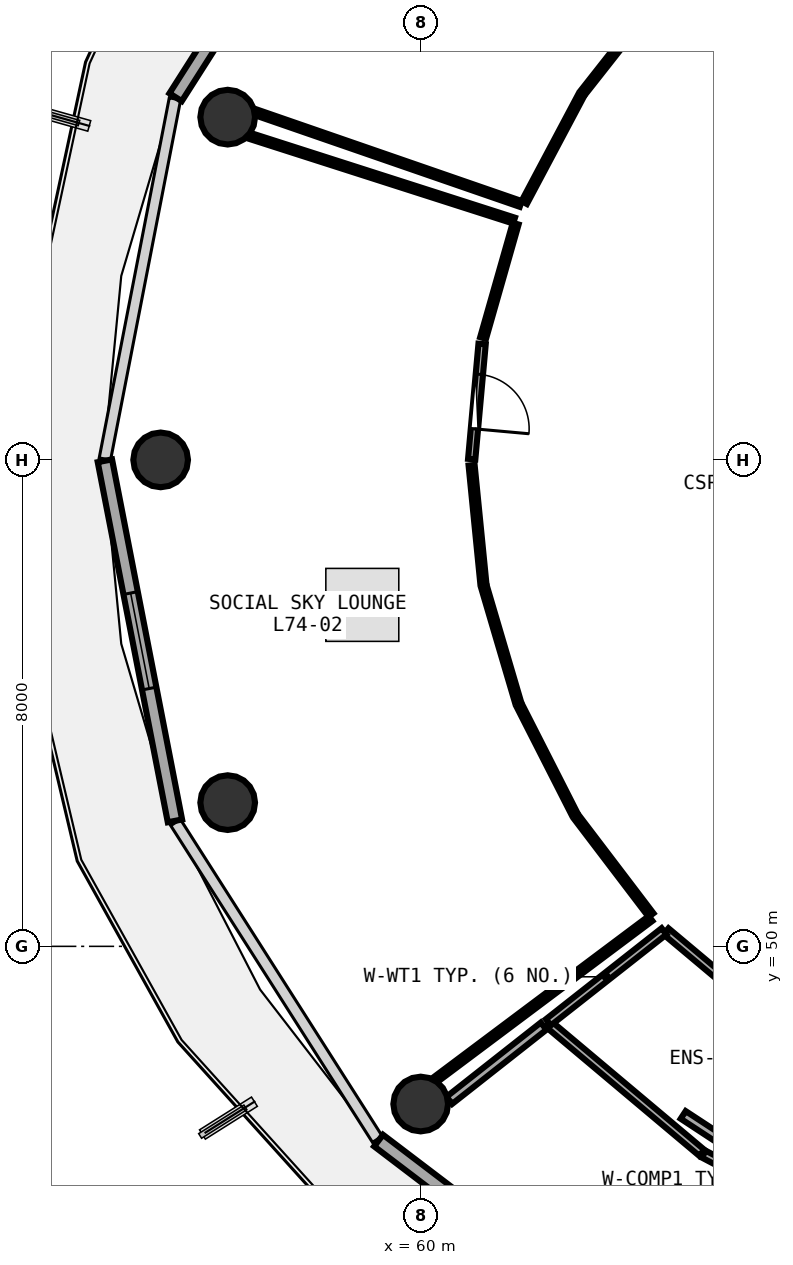
"""IFC4 building model, lengths in metres.
Left out: names, types, materials, properties, quantities, classifications, styles, units other than length and angle.
Written with IfcOpenShell. Run it as: python <this file> out.ifc"""

import sys

from ifc_helpers import new_model, si_unit, direction, frame, frame_2d, origin, origin_2d, place, context, subcontext, project, spatial, rectangle, circle, extrude, element, fill, save


model = new_model("IFC4")
c1 = context("Model", 3, precision=1e-05, world=origin(), true_north=direction((0.0, 1.0)))
c2 = subcontext(c1, "Body", "Model", "MODEL_VIEW")
j1 = project(units=[si_unit("LENGTHUNIT", "METRE"), si_unit("PLANEANGLEUNIT", "RADIAN")], contexts=[c1])
p1 = place(None, origin())
s1 = spatial("IfcSite", under=j1, at=p1, CompositionType="ELEMENT")
p2 = place(p1, origin())
s2 = spatial("IfcBuilding", under=s1, at=p2, CompositionType="ELEMENT")
p3 = place(p2, frame((0.0, 0.0, 289.95)))
s3 = spatial("IfcBuildingStorey", under=s2, at=p3, CompositionType="ELEMENT", Elevation=289.95)
for number, where, z_axis, x_axis in (
    (1, (56.823, 63.636, 0.0), (0.0, 0.0, 1.0), (1.0, 0.0, 0.0)),
    (2, (55.72, 58.0, 0.0), (0.0, 0.0, 1.0), (1.0, 0.0, 0.0)),
    (3, (56.823, 52.364, 0.0), (0.0, 0.0, 1.0), (1.0, 0.0, 0.0)),
    (4, (59.997, 47.407, 0.0), (0.0, 0.0, 1.0), (1.0, 0.0, 0.0)),
):
    element("IfcColumn", number, at=place(p3, frame(where, z_axis=z_axis, x_axis=x_axis)), inside=s3, PredefinedType="COLUMN", context=c2, shape_type="SweptSolid", body=[
        extrude(circle(Radius=0.45, at=origin_2d()), origin(), (0.0, 0.0, 1.0), 3.75),
    ])
p4 = place(p3, frame((59.284, 69.172, 0.0), z_axis=(0.0, 0.0, 1.0), x_axis=(-0.537271968456, -0.843409053728, 0.0)))
e5 = element("IfcWall", 5, at=p4, inside=s3, PredefinedType="SOLIDWALL", context=c2, shape_type="SweptSolid", body=[
    extrude(rectangle(XDim=6.175, YDim=0.24, at=frame_2d((3.087, 0.0))), origin(), (0.0, 0.0, 1.0), 3.415),
])
p5 = place(p4, frame((2.613, 0.0, 0.0)))
e6 = element("IfcOpeningElement", 6, at=p5, cuts=e5, PredefinedType="OPENING", context=c2, shape_type="SweptSolid", body=[
    extrude(rectangle(XDim=0.95, YDim=2.1, at=frame_2d((0.475, 1.05))), frame((0.0, 0.13, 0.0), z_axis=(0.0, -1.0, 0.0), x_axis=(1.0, 0.0, 0.0)), (0.0, 0.0, 1.0), 0.26),
])
p6 = place(p4, frame((3.913, 0.0, 0.85)))
e7 = element("IfcOpeningElement", 7, at=p6, cuts=e5, PredefinedType="OPENING", context=c2, shape_type="SweptSolid", body=[
    extrude(rectangle(XDim=1.2, YDim=1.45, at=frame_2d((0.6, 0.725))), frame((0.0, 0.13, 0.0), z_axis=(0.0, -1.0, 0.0), x_axis=(1.0, 0.0, 0.0)), (0.0, 0.0, 1.0), 0.26),
])
p7 = place(p3, frame((54.803, 57.985, 0.0), z_axis=(0.0, 0.0, 1.0), x_axis=(0.190969309115, -0.981596008028, 0.0)))
e8 = element("IfcWall", 8, at=p7, inside=s3, PredefinedType="SOLIDWALL", context=c2, shape_type="SweptSolid", body=[
    extrude(rectangle(XDim=6.033, YDim=0.24, at=frame_2d((3.017, 0.0))), origin(), (0.0, 0.0, 1.0), 3.415),
])
p8 = place(p7, frame((2.216, 0.0, 0.85)))
e9 = element("IfcOpeningElement", 9, at=p8, cuts=e8, PredefinedType="OPENING", context=c2, shape_type="SweptSolid", body=[
    extrude(rectangle(XDim=1.6, YDim=1.45, at=frame_2d((0.8, 0.725))), frame((0.0, 0.13, 0.0), z_axis=(0.0, -1.0, 0.0), x_axis=(1.0, 0.0, 0.0)), (0.0, 0.0, 1.0), 0.26),
])
p9 = place(p3, frame((59.304, 46.806, 0.0), z_axis=(0.0, 0.0, 1.0), x_axis=(0.796010444211, -0.605282886514, 0.0)))
e10 = element("IfcWall", 10, at=p9, inside=s3, PredefinedType="SOLIDWALL", context=c2, shape_type="SweptSolid", body=[
    extrude(rectangle(XDim=6.387, YDim=0.24, at=frame_2d((3.194, 0.0))), origin(), (0.0, 0.0, 1.0), 3.415),
])
p10 = place(p9, frame((2.394, 0.0, 0.85)))
e11 = element("IfcOpeningElement", 11, at=p10, cuts=e10, PredefinedType="OPENING", context=c2, shape_type="SweptSolid", body=[
    extrude(rectangle(XDim=1.6, YDim=1.45, at=frame_2d((0.8, 0.725))), frame((0.0, 0.13, 0.0), z_axis=(0.0, -1.0, 0.0), x_axis=(1.0, 0.0, 0.0)), (0.0, 0.0, 1.0), 0.26),
])
p11 = place(p3, frame((61.007, 59.906, 0.0), z_axis=(0.0, 0.0, 1.0), x_axis=(-0.089968706127, -0.995944592795, 0.0)))
e12 = element("IfcWall", 12, at=p11, inside=s3, PredefinedType="PARTITIONING", context=c2, shape_type="SweptSolid", body=[
    extrude(rectangle(XDim=1.902, YDim=0.12, at=frame_2d((0.951, 0.0))), origin(), (0.0, 0.0, 1.0), 3.015),
])
p12 = place(p11, frame((0.501, 0.0, 0.0)))
e13 = element("IfcOpeningElement", 13, at=p12, cuts=e12, PredefinedType="OPENING", context=c2, shape_type="SweptSolid", body=[
    extrude(rectangle(XDim=0.9, YDim=2.08, at=frame_2d((0.45, 1.04))), frame((0.0, 0.07, 0.0), z_axis=(0.0, -1.0, 0.0), x_axis=(1.0, 0.0, 0.0)), (0.0, 0.0, 1.0), 0.14),
])
p13 = place(p3, frame((63.921, 65.635, 0.0), z_axis=(0.0, 0.0, 1.0), x_axis=(-0.618820199788, -0.785532660259, 0.0)))
e14 = element("IfcWall", 14, at=p13, inside=s3, PredefinedType="PARTITIONING", context=c2, shape_type="SweptSolid", body=[
    extrude(rectangle(XDim=2.018, YDim=0.1, at=frame_2d((1.009, 0.0))), origin(), (0.0, 0.0, 1.0), 3.015),
])
p14 = place(p3, frame((62.629, 63.984, 0.0), z_axis=(0.0, 0.0, 1.0), x_axis=(-0.468933294906, -0.883233584579, 0.0)))
e15 = element("IfcWall", 15, at=p14, inside=s3, PredefinedType="PARTITIONING", context=c2, shape_type="SweptSolid", body=[
    extrude(rectangle(XDim=1.984, YDim=0.1, at=frame_2d((0.992, 0.0))), origin(), (0.0, 0.0, 1.0), 3.175),
])
p15 = place(p3, frame((61.642, 62.209, 0.0), z_axis=(0.0, 0.0, 1.0), x_axis=(-0.945103281494, 0.326771766388, 0.0)))
e16 = element("IfcWall", 16, at=p15, inside=s3, PredefinedType="PARTITIONING", context=c2, shape_type="SweptSolid", body=[
    extrude(rectangle(XDim=4.604, YDim=0.1, at=frame_2d((2.302, 0.0))), origin(), (0.0, 0.0, 1.0), 3.015),
])
p16 = place(p3, frame((61.559, 61.885, 0.0), z_axis=(0.0, 0.0, 1.0), x_axis=(-0.274226302341, -0.961665188673, 0.0)))
e17 = element("IfcWall", 17, at=p16, inside=s3, PredefinedType="PARTITIONING", context=c2, shape_type="SweptSolid", body=[
    extrude(rectangle(XDim=1.955, YDim=0.1, at=frame_2d((0.978, 0.0))), origin(), (0.0, 0.0, 1.0), 3.42),
])
p17 = place(p3, frame((60.834, 57.912, 0.0), z_axis=(0.0, 0.0, 1.0), x_axis=(0.098769631998, -0.995110325439, 0.0)))
e18 = element("IfcWall", 18, at=p17, inside=s3, PredefinedType="PARTITIONING", context=c2, shape_type="SweptSolid", body=[
    extrude(rectangle(XDim=1.943, YDim=0.1, at=frame_2d((0.971, 0.0))), origin(), (0.0, 0.0, 1.0), 3.015),
])
p18 = place(p3, frame((61.041, 55.901, 0.0), z_axis=(0.0, 0.0, 1.0), x_axis=(0.28293653612, -0.959138632591, 0.0)))
e19 = element("IfcWall", 19, at=p18, inside=s3, PredefinedType="PARTITIONING", context=c2, shape_type="SweptSolid", body=[
    extrude(rectangle(XDim=1.956, YDim=0.1, at=frame_2d((0.978, 0.0))), origin(), (0.0, 0.0, 1.0), 3.42),
])
p19 = place(p3, frame((61.624, 53.95, 0.0), z_axis=(0.0, 0.0, 1.0), x_axis=(0.453658133306, -0.891175795276, 0.0)))
e20 = element("IfcWall", 20, at=p19, inside=s3, PredefinedType="PARTITIONING", context=c2, shape_type="SweptSolid", body=[
    extrude(rectangle(XDim=1.981, YDim=0.1, at=frame_2d((0.991, 0.0))), origin(), (0.0, 0.0, 1.0), 3.175),
])
p20 = place(p3, frame((62.565, 52.117, 0.0), z_axis=(0.0, 0.0, 1.0), x_axis=(0.605473441765, -0.795865510823, 0.0)))
e21 = element("IfcWall", 21, at=p20, inside=s3, PredefinedType="PARTITIONING", context=c2, shape_type="SweptSolid", body=[
    extrude(rectangle(XDim=2.014, YDim=0.1, at=frame_2d((1.007, 0.0))), origin(), (0.0, 0.0, 1.0), 3.015),
])
p21 = place(p3, frame((63.777, 50.458, 0.0), z_axis=(0.0, 0.0, 1.0), x_axis=(-0.800384816546, -0.599486568191, 0.0)))
e22 = element("IfcWall", 22, at=p21, inside=s3, PredefinedType="PARTITIONING", context=c2, shape_type="SweptSolid", body=[
    extrude(rectangle(XDim=4.414, YDim=0.1, at=frame_2d((2.207, 0.0))), origin(), (0.0, 0.0, 1.0), 3.115),
])
p22 = place(p3, frame((57.184, 63.329, 0.0), z_axis=(0.0, 0.0, 1.0), x_axis=(0.95227750557, -0.305233602976, 0.0)))
e23 = element("IfcWall", 23, at=p22, inside=s3, PredefinedType="PARTITIONING", context=c2, shape_type="SweptSolid", body=[
    extrude(rectangle(XDim=4.565, YDim=0.1, at=frame_2d((2.283, 0.0))), origin(), (0.0, 0.0, 1.0), 3.115),
])
p23 = place(p3, frame((64.03, 50.247, 0.0), z_axis=(0.0, 0.0, 1.0), x_axis=(0.766167599315, -0.642640809286, 0.0)))
e24 = element("IfcWall", 24, at=p23, inside=s3, PredefinedType="PLUMBINGWALL", context=c2, shape_type="SweptSolid", body=[
    extrude(rectangle(XDim=2.753, YDim=0.13, at=frame_2d((1.376, 0.0))), origin(), (0.0, 0.0, 1.0), 3.015),
])
p24 = place(p3, frame((67.633, 45.016, 0.0), z_axis=(0.0, 0.0, 1.0), x_axis=(-0.885210583291, 0.465190523581, 0.0)))
e25 = element("IfcWall", 25, at=p24, inside=s3, PredefinedType="PLUMBINGWALL", context=c2, shape_type="SweptSolid", body=[
    extrude(rectangle(XDim=3.367, YDim=0.13, at=frame_2d((1.684, 0.0))), origin(), (0.0, 0.0, 1.0), 3.015),
])
p25 = place(p3, frame((64.62, 46.605, 0.0), z_axis=(0.0, 0.0, 1.0), x_axis=(-0.765494729633, 0.643442164382, 0.0)))
e26 = element("IfcWall", 26, at=p25, inside=s3, PredefinedType="PLUMBINGWALL", context=c2, shape_type="SweptSolid", body=[
    extrude(rectangle(XDim=3.296, YDim=0.13, at=frame_2d((1.648, 0.0))), origin(), (0.0, 0.0, 1.0), 3.015),
])
p26 = place(p3, frame((62.097, 48.751, 0.0), z_axis=(0.0, 0.0, 1.0), x_axis=(0.786076764473, 0.618128886525, 0.0)))
e27 = element("IfcWall", 27, at=p26, inside=s3, PredefinedType="PLUMBINGWALL", context=c2, shape_type="SweptSolid", body=[
    extrude(rectangle(XDim=2.42, YDim=0.13, at=frame_2d((1.21, 0.0))), origin(), (0.0, 0.0, 1.0), 3.015),
])
p27 = place(p3, frame((60.468, 47.468, 0.0), z_axis=(0.0, 0.0, 1.0), x_axis=(0.785768578647, 0.618520606618, 0.0)))
e28 = element("IfcWall", 28, at=p27, inside=s3, PredefinedType="PARTITIONING", context=c2, shape_type="SweptSolid", body=[
    extrude(rectangle(XDim=1.974, YDim=0.15, at=frame_2d((0.987, 0.0))), origin(), (0.0, 0.0, 1.0), 3.015),
])
p28 = place(p3, frame((64.314, 47.228, 0.0), z_axis=(0.0, 0.0, 1.0), x_axis=(0.836108744157, -0.54856373189, 0.0)))
e29 = element("IfcWall", 29, at=p28, inside=s3, PredefinedType="PARTITIONING", context=c2, shape_type="SweptSolid", body=[
    extrude(rectangle(XDim=1.381, YDim=0.15, at=frame_2d((0.69, 0.0))), origin(), (0.0, 0.0, 1.0), 3.015),
])
p29 = place(p8, origin())
e30 = element("IfcWindow", 30, at=p29, inside=s3, PartitioningType="SINGLE_PANEL", PredefinedType="WINDOW", context=c2, shape_type="SweptSolid", body=[
    extrude(rectangle(XDim=1.6, YDim=1.45, at=frame_2d((0.8, 0.725))), frame((0.0, 0.03, 0.0), z_axis=(0.0, -1.0, 0.0), x_axis=(1.0, 0.0, 0.0)), (0.0, 0.0, 1.0), 0.06),
])
fill(e9, e30)
p30 = place(p12, origin())
e31 = element("IfcDoor", 31, at=p30, inside=s3, OperationType="SINGLE_SWING_RIGHT", PredefinedType="DOOR", context=c2, shape_type="SweptSolid", body=[
    extrude(rectangle(XDim=0.9, YDim=2.08, at=frame_2d((0.45, 1.04))), frame((0.0, 0.025, 0.0), z_axis=(0.0, -1.0, 0.0), x_axis=(1.0, 0.0, 0.0)), (0.0, 0.0, 1.0), 0.05),
])
fill(e13, e31)
save(model, sys.argv[1])
